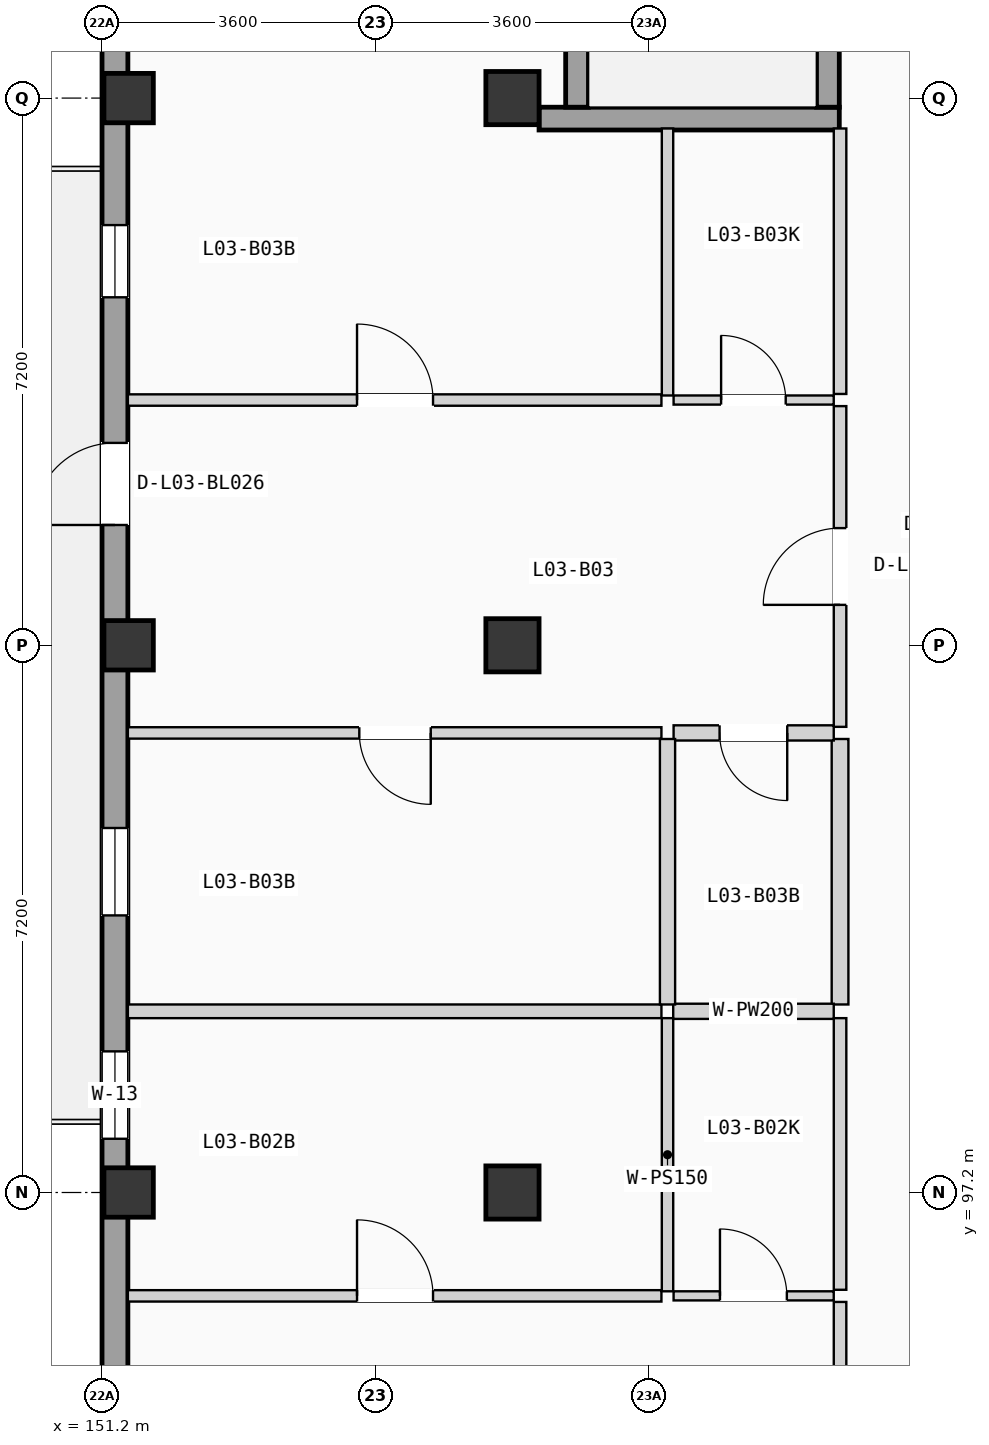
"""IFC4 building model, lengths in metres.
Left out: names, types, materials, properties, quantities, classifications, styles, units other than length and angle.
Written with IfcOpenShell. Run it as: python <this file> out.ifc"""

import sys

from ifc_helpers import new_model, si_unit, direction, frame, frame_2d, origin, origin_2d, place, context, subcontext, project, spatial, rectangle, extrude, element, fill, save


model = new_model("IFC4")
c1 = context("Model", 3, precision=1e-05, world=origin(), true_north=direction((0.0, 1.0)))
c2 = subcontext(c1, "Body", "Model", "MODEL_VIEW")
j1 = project(units=[si_unit("LENGTHUNIT", "METRE"), si_unit("PLANEANGLEUNIT", "RADIAN")], contexts=[c1])
p1 = place(None, origin())
s1 = spatial("IfcSite", under=j1, at=p1, CompositionType="ELEMENT")
p2 = place(p1, origin())
s2 = spatial("IfcBuilding", under=s1, at=p2, CompositionType="ELEMENT")
p3 = place(p2, frame((0.0, 0.0, 12.075)))
s3 = spatial("IfcBuildingStorey", under=s2, at=p3, CompositionType="ELEMENT", Elevation=12.075)
for number, where, z_axis, x_axis in (
    (1, (151.55, 97.2, 0.0), (0.0, 0.0, 1.0), (1.0, 0.0, 0.0)),
    (2, (151.55, 104.4, 0.0), (0.0, 0.0, 1.0), (1.0, 0.0, 0.0)),
    (3, (151.55, 111.6, 0.0), (0.0, 0.0, 1.0), (1.0, 0.0, 0.0)),
):
    element("IfcColumn", number, at=place(p3, frame(where, z_axis=z_axis, x_axis=x_axis)), inside=s3, PredefinedType="COLUMN", context=c2, shape_type="SweptSolid", body=[
        extrude(rectangle(XDim=0.65, YDim=0.65, at=origin_2d()), origin(), (0.0, 0.0, 1.0), 3.15),
    ])
for number, where, z_axis, x_axis in (
    (4, (156.6, 97.2, 0.0), (0.0, 0.0, 1.0), (1.0, 0.0, 0.0)),
    (5, (156.6, 104.4, 0.0), (0.0, 0.0, 1.0), (1.0, 0.0, 0.0)),
    (6, (156.6, 111.6, 0.0), (0.0, 0.0, 1.0), (1.0, 0.0, 0.0)),
):
    element("IfcColumn", number, at=place(p3, frame(where, z_axis=z_axis, x_axis=x_axis)), inside=s3, PredefinedType="COLUMN", context=c2, shape_type="SweptSolid", body=[
        extrude(rectangle(XDim=0.7, YDim=0.7, at=origin_2d()), origin(), (0.0, 0.0, 1.0), 3.15),
    ])
p4 = place(p3, frame((151.37, 68.74, 0.0), z_axis=(0.0, 0.0, 1.0), x_axis=(0.0, 1.0, 0.0)))
e7 = element("IfcWall", 7, at=p4, inside=s3, PredefinedType="SOLIDWALL", context=c2, shape_type="SweptSolid", body=[
    extrude(rectangle(XDim=49.72, YDim=0.34, at=frame_2d((24.86, 0.0))), origin(), (0.0, 0.0, 1.0), 2.89),
])
p5 = place(p4, frame((11.462, 0.0, 0.0)))
e8 = element("IfcOpeningElement", 8, at=p5, cuts=e7, PredefinedType="OPENING", context=c2, shape_type="SweptSolid", body=[
    extrude(rectangle(XDim=0.95, YDim=2.15, at=frame_2d((0.475, 1.075))), frame((0.0, 0.18, 0.0), z_axis=(0.0, -1.0, 0.0), x_axis=(1.0, 0.0, 0.0)), (0.0, 0.0, 1.0), 0.36),
])
p6 = place(p4, frame((8.481, 0.0, 0.555)))
e9 = element("IfcOpeningElement", 9, at=p6, cuts=e7, PredefinedType="OPENING", context=c2, shape_type="SweptSolid", body=[
    extrude(rectangle(XDim=1.05, YDim=1.65, at=frame_2d((0.525, 0.825))), frame((0.0, 0.18, 0.0), z_axis=(0.0, -1.0, 0.0), x_axis=(1.0, 0.0, 0.0)), (0.0, 0.0, 1.0), 0.36),
])
p7 = place(p4, frame((16.565, 0.0, 0.85)))
e10 = element("IfcOpeningElement", 10, at=p7, cuts=e7, PredefinedType="OPENING", context=c2, shape_type="SweptSolid", body=[
    extrude(rectangle(XDim=0.95, YDim=1.2, at=frame_2d((0.475, 0.6))), frame((0.0, 0.18, 0.0), z_axis=(0.0, -1.0, 0.0), x_axis=(1.0, 0.0, 0.0)), (0.0, 0.0, 1.0), 0.36),
])
p8 = place(p4, frame((24.285, 0.0, 0.9)))
e11 = element("IfcOpeningElement", 11, at=p8, cuts=e7, PredefinedType="OPENING", context=c2, shape_type="SweptSolid", body=[
    extrude(rectangle(XDim=1.15, YDim=1.2, at=frame_2d((0.575, 0.6))), frame((0.0, 0.18, 0.0), z_axis=(0.0, -1.0, 0.0), x_axis=(1.0, 0.0, 0.0)), (0.0, 0.0, 1.0), 0.36),
])
p9 = place(p4, frame((19.403, 0.0, 0.855)))
e12 = element("IfcOpeningElement", 12, at=p9, cuts=e7, PredefinedType="OPENING", context=c2, shape_type="SweptSolid", body=[
    extrude(rectangle(XDim=1.15, YDim=1.35, at=frame_2d((0.575, 0.675))), frame((0.0, 0.18, 0.0), z_axis=(0.0, -1.0, 0.0), x_axis=(1.0, 0.0, 0.0)), (0.0, 0.0, 1.0), 0.36),
])
p10 = place(p4, frame((29.167, 0.0, 0.705)))
e13 = element("IfcOpeningElement", 13, at=p10, cuts=e7, PredefinedType="OPENING", context=c2, shape_type="SweptSolid", body=[
    extrude(rectangle(XDim=1.15, YDim=1.5, at=frame_2d((0.575, 0.75))), frame((0.0, 0.18, 0.0), z_axis=(0.0, -1.0, 0.0), x_axis=(1.0, 0.0, 0.0)), (0.0, 0.0, 1.0), 0.36),
])
p11 = place(p4, frame((37.243, 0.0, 0.0)))
e14 = element("IfcOpeningElement", 14, at=p11, cuts=e7, PredefinedType="OPENING", context=c2, shape_type="SweptSolid", body=[
    extrude(rectangle(XDim=1.08, YDim=2.18, at=frame_2d((0.54, 1.09))), frame((0.0, 0.18, 0.0), z_axis=(0.0, -1.0, 0.0), x_axis=(1.0, 0.0, 0.0)), (0.0, 0.0, 1.0), 0.36),
])
p12 = place(p4, frame((32.106, 0.0, 0.555)))
e15 = element("IfcOpeningElement", 15, at=p12, cuts=e7, PredefinedType="OPENING", context=c2, shape_type="SweptSolid", body=[
    extrude(rectangle(XDim=1.15, YDim=1.65, at=frame_2d((0.575, 0.825))), frame((0.0, 0.18, 0.0), z_axis=(0.0, -1.0, 0.0), x_axis=(1.0, 0.0, 0.0)), (0.0, 0.0, 1.0), 0.36),
])
p13 = place(p4, frame((40.239, 0.0, 0.85)))
e16 = element("IfcOpeningElement", 16, at=p13, cuts=e7, PredefinedType="OPENING", context=c2, shape_type="SweptSolid", body=[
    extrude(rectangle(XDim=0.95, YDim=1.2, at=frame_2d((0.475, 0.6))), frame((0.0, 0.18, 0.0), z_axis=(0.0, -1.0, 0.0), x_axis=(1.0, 0.0, 0.0)), (0.0, 0.0, 1.0), 0.36),
])
p14 = place(p3, frame((156.95, 111.33, 0.0), z_axis=(0.0, 0.0, 1.0), x_axis=(1.0, 0.0, 0.0)))
e17 = element("IfcWall", 17, at=p14, inside=s3, PredefinedType="SHEAR", context=c2, shape_type="SweptSolid", body=[
    extrude(rectangle(XDim=3.95, YDim=0.3, at=frame_2d((1.975, 0.0))), origin(), (0.0, 0.0, 1.0), 2.89),
])
p15 = place(p3, frame((157.45, 111.48, 0.0), z_axis=(0.0, 0.0, 1.0), x_axis=(0.0, 1.0, 0.0)))
e18 = element("IfcWall", 18, at=p15, inside=s3, PredefinedType="SHEAR", context=c2, shape_type="SweptSolid", body=[
    extrude(rectangle(XDim=7.0, YDim=0.3, at=frame_2d((3.5, 0.0))), origin(), (0.0, 0.0, 1.0), 2.89),
])
p16 = place(p3, frame((160.75, 111.48, 0.0), z_axis=(0.0, 0.0, 1.0), x_axis=(0.0, 1.0, 0.0)))
e19 = element("IfcWall", 19, at=p16, inside=s3, PredefinedType="SHEAR", context=c2, shape_type="SweptSolid", body=[
    extrude(rectangle(XDim=7.0, YDim=0.3, at=frame_2d((3.5, 0.0))), origin(), (0.0, 0.0, 1.0), 2.89),
])
p17 = place(p16, frame((5.625, 0.0, 0.0)))
e20 = element("IfcOpeningElement", 20, at=p17, cuts=e19, PredefinedType="OPENING", context=c2, shape_type="SweptSolid", body=[
    extrude(rectangle(XDim=1.15, YDim=2.12, at=frame_2d((0.575, 1.06))), frame((0.0, 0.16, 0.0), z_axis=(0.0, -1.0, 0.0), x_axis=(1.0, 0.0, 0.0)), (0.0, 0.0, 1.0), 0.32),
])
p18 = place(p3, frame((160.91, 91.44, 0.0), z_axis=(0.0, 0.0, 1.0), x_axis=(0.0, 1.0, 0.0)))
e21 = element("IfcWall", 21, at=p18, inside=s3, PredefinedType="PARTITIONING", context=c2, shape_type="SweptSolid", body=[
    extrude(rectangle(XDim=4.32, YDim=0.165, at=frame_2d((2.16, 0.0))), origin(), (0.0, 0.0, 1.0), 2.87),
])
p19 = place(p18, frame((1.655, 0.0, 0.0)))
e22 = element("IfcOpeningElement", 22, at=p19, cuts=e21, PredefinedType="OPENING", context=c2, shape_type="SweptSolid", body=[
    extrude(rectangle(XDim=1.01, YDim=2.11, at=frame_2d((0.505, 1.055))), frame((0.0, 0.093, 0.0), z_axis=(0.0, -1.0, 0.0), x_axis=(1.0, 0.0, 0.0)), (0.0, 0.0, 1.0), 0.185),
])
p20 = place(p3, frame((160.91, 95.92, 0.0), z_axis=(0.0, 0.0, 1.0), x_axis=(0.0, 1.0, 0.0)))
e23 = element("IfcWall", 23, at=p20, inside=s3, PredefinedType="PARTITIONING", context=c2, shape_type="SweptSolid", body=[
    extrude(rectangle(XDim=3.574, YDim=0.165, at=frame_2d((1.787, 0.0))), origin(), (0.0, 0.0, 1.0), 2.87),
])
p21 = place(p3, frame((160.91, 103.327, 0.0), z_axis=(0.0, 0.0, 1.0), x_axis=(0.0, 1.0, 0.0)))
e24 = element("IfcWall", 24, at=p21, inside=s3, PredefinedType="PARTITIONING", context=c2, shape_type="SweptSolid", body=[
    extrude(rectangle(XDim=4.22, YDim=0.165, at=frame_2d((2.11, 0.0))), origin(), (0.0, 0.0, 1.0), 2.87),
])
p22 = place(p21, frame((1.605, 0.0, 0.0)))
e25 = element("IfcOpeningElement", 25, at=p22, cuts=e24, PredefinedType="OPENING", context=c2, shape_type="SweptSolid", body=[
    extrude(rectangle(XDim=1.01, YDim=2.11, at=frame_2d((0.505, 1.055))), frame((0.0, 0.093, 0.0), z_axis=(0.0, -1.0, 0.0), x_axis=(1.0, 0.0, 0.0)), (0.0, 0.0, 1.0), 0.185),
])
p23 = place(p3, frame((160.91, 99.674, 0.0), z_axis=(0.0, 0.0, 1.0), x_axis=(0.0, 1.0, 0.0)))
e26 = element("IfcWall", 26, at=p23, inside=s3, PredefinedType="PLUMBINGWALL", context=c2, shape_type="SweptSolid", body=[
    extrude(rectangle(XDim=3.493, YDim=0.22, at=frame_2d((1.747, 0.0))), origin(), (0.0, 0.0, 1.0), 2.87),
])
p24 = place(p3, frame((160.91, 107.707, 0.0), z_axis=(0.0, 0.0, 1.0), x_axis=(0.0, 1.0, 0.0)))
e27 = element("IfcWall", 27, at=p24, inside=s3, PredefinedType="PARTITIONING", context=c2, shape_type="SweptSolid", body=[
    extrude(rectangle(XDim=3.493, YDim=0.165, at=frame_2d((1.747, 0.0))), origin(), (0.0, 0.0, 1.0), 2.87),
])
p25 = place(p3, frame((158.72, 95.84, 0.0), z_axis=(0.0, 0.0, 1.0), x_axis=(1.0, 0.0, 0.0)))
e28 = element("IfcWall", 28, at=p25, inside=s3, PredefinedType="PARTITIONING", context=c2, shape_type="SweptSolid", body=[
    extrude(rectangle(XDim=2.107, YDim=0.12, at=frame_2d((1.053, 0.0))), origin(), (0.0, 0.0, 1.0), 2.87),
])
p26 = place(p25, frame((0.61, 0.0, 0.0)))
e29 = element("IfcOpeningElement", 29, at=p26, cuts=e28, PredefinedType="OPENING", context=c2, shape_type="SweptSolid", body=[
    extrude(rectangle(XDim=0.88, YDim=2.02, at=frame_2d((0.44, 1.01))), frame((0.0, 0.07, 0.0), z_axis=(0.0, -1.0, 0.0), x_axis=(1.0, 0.0, 0.0)), (0.0, 0.0, 1.0), 0.14),
])
p27 = place(p3, frame((151.54, 95.84, 0.0), z_axis=(0.0, 0.0, 1.0), x_axis=(1.0, 0.0, 0.0)))
e30 = element("IfcWall", 30, at=p27, inside=s3, PredefinedType="PARTITIONING", context=c2, shape_type="SweptSolid", body=[
    extrude(rectangle(XDim=7.02, YDim=0.15, at=frame_2d((3.51, 0.0))), origin(), (0.0, 0.0, 1.0), 2.87),
])
p28 = place(p27, frame((3.015, 0.0, 0.0)))
e31 = element("IfcOpeningElement", 31, at=p28, cuts=e30, PredefinedType="OPENING", context=c2, shape_type="SweptSolid", body=[
    extrude(rectangle(XDim=1.0, YDim=2.06, at=frame_2d((0.5, 1.03))), frame((0.0, 0.085, 0.0), z_axis=(0.0, -1.0, 0.0), x_axis=(1.0, 0.0, 0.0)), (0.0, 0.0, 1.0), 0.17),
])
p29 = place(p3, frame((158.64, 95.9, 0.0), z_axis=(0.0, 0.0, 1.0), x_axis=(0.0, 1.0, 0.0)))
e32 = element("IfcWall", 32, at=p29, inside=s3, PredefinedType="PARTITIONING", context=c2, shape_type="SweptSolid", body=[
    extrude(rectangle(XDim=3.594, YDim=0.15, at=frame_2d((1.797, 0.0))), origin(), (0.0, 0.0, 1.0), 2.87),
])
p30 = place(p3, frame((158.715, 99.584, 0.0), z_axis=(0.0, 0.0, 1.0), x_axis=(1.0, 0.0, 0.0)))
e33 = element("IfcWall", 33, at=p30, inside=s3, PredefinedType="PLUMBINGWALL", context=c2, shape_type="SweptSolid", body=[
    extrude(rectangle(XDim=2.112, YDim=0.2, at=frame_2d((1.056, 0.0))), origin(), (0.0, 0.0, 1.0), 2.87),
])
p31 = place(p3, frame((151.54, 99.584, 0.0), z_axis=(0.0, 0.0, 1.0), x_axis=(1.0, 0.0, 0.0)))
e34 = element("IfcWall", 34, at=p31, inside=s3, PredefinedType="PARTITIONING", context=c2, shape_type="SweptSolid", body=[
    extrude(rectangle(XDim=7.02, YDim=0.18, at=frame_2d((3.51, 0.0))), origin(), (0.0, 0.0, 1.0), 2.87),
])
p32 = place(p3, frame((158.72, 103.247, 0.0), z_axis=(0.0, 0.0, 1.0), x_axis=(1.0, 0.0, 0.0)))
e35 = element("IfcWall", 35, at=p32, inside=s3, PredefinedType="PLUMBINGWALL", context=c2, shape_type="SweptSolid", body=[
    extrude(rectangle(XDim=2.107, YDim=0.2, at=frame_2d((1.053, 0.0))), origin(), (0.0, 0.0, 1.0), 2.87),
])
p33 = place(p32, frame((0.605, 0.0, 0.0)))
e36 = element("IfcOpeningElement", 36, at=p33, cuts=e35, PredefinedType="OPENING", context=c2, shape_type="SweptSolid", body=[
    extrude(rectangle(XDim=0.89, YDim=2.03, at=frame_2d((0.445, 1.015))), frame((0.0, 0.11, 0.0), z_axis=(0.0, -1.0, 0.0), x_axis=(1.0, 0.0, 0.0)), (0.0, 0.0, 1.0), 0.22),
])
p34 = place(p3, frame((158.72, 107.627, 0.0), z_axis=(0.0, 0.0, 1.0), x_axis=(1.0, 0.0, 0.0)))
e37 = element("IfcWall", 37, at=p34, inside=s3, PredefinedType="PARTITIONING", context=c2, shape_type="SweptSolid", body=[
    extrude(rectangle(XDim=2.107, YDim=0.12, at=frame_2d((1.053, 0.0))), origin(), (0.0, 0.0, 1.0), 2.87),
])
p35 = place(p34, frame((0.625, 0.0, 0.0)))
e38 = element("IfcOpeningElement", 38, at=p35, cuts=e37, PredefinedType="OPENING", context=c2, shape_type="SweptSolid", body=[
    extrude(rectangle(XDim=0.85, YDim=2.01, at=frame_2d((0.425, 1.005))), frame((0.0, 0.07, 0.0), z_axis=(0.0, -1.0, 0.0), x_axis=(1.0, 0.0, 0.0)), (0.0, 0.0, 1.0), 0.14),
])
p36 = place(p3, frame((151.54, 103.247, 0.0), z_axis=(0.0, 0.0, 1.0), x_axis=(1.0, 0.0, 0.0)))
e39 = element("IfcWall", 39, at=p36, inside=s3, PredefinedType="PARTITIONING", context=c2, shape_type="SweptSolid", body=[
    extrude(rectangle(XDim=7.02, YDim=0.15, at=frame_2d((3.51, 0.0))), origin(), (0.0, 0.0, 1.0), 2.87),
])
p37 = place(p36, frame((3.045, 0.0, 0.0)))
e40 = element("IfcOpeningElement", 40, at=p37, cuts=e39, PredefinedType="OPENING", context=c2, shape_type="SweptSolid", body=[
    extrude(rectangle(XDim=0.94, YDim=2.06, at=frame_2d((0.47, 1.03))), frame((0.0, 0.085, 0.0), z_axis=(0.0, -1.0, 0.0), x_axis=(1.0, 0.0, 0.0)), (0.0, 0.0, 1.0), 0.17),
])
p38 = place(p3, frame((151.54, 107.627, 0.0), z_axis=(0.0, 0.0, 1.0), x_axis=(1.0, 0.0, 0.0)))
e41 = element("IfcWall", 41, at=p38, inside=s3, PredefinedType="PARTITIONING", context=c2, shape_type="SweptSolid", body=[
    extrude(rectangle(XDim=7.02, YDim=0.15, at=frame_2d((3.51, 0.0))), origin(), (0.0, 0.0, 1.0), 2.87),
])
p39 = place(p38, frame((3.015, 0.0, 0.0)))
e42 = element("IfcOpeningElement", 42, at=p39, cuts=e41, PredefinedType="OPENING", context=c2, shape_type="SweptSolid", body=[
    extrude(rectangle(XDim=1.0, YDim=2.06, at=frame_2d((0.5, 1.03))), frame((0.0, 0.085, 0.0), z_axis=(0.0, -1.0, 0.0), x_axis=(1.0, 0.0, 0.0)), (0.0, 0.0, 1.0), 0.17),
])
p40 = place(p3, frame((158.64, 99.674, 0.0), z_axis=(0.0, 0.0, 1.0), x_axis=(0.0, 1.0, 0.0)))
e43 = element("IfcWall", 43, at=p40, inside=s3, PredefinedType="PLUMBINGWALL", context=c2, shape_type="SweptSolid", body=[
    extrude(rectangle(XDim=3.493, YDim=0.2, at=frame_2d((1.747, 0.0))), origin(), (0.0, 0.0, 1.0), 2.87),
])
p41 = place(p3, frame((158.64, 107.687, 0.0), z_axis=(0.0, 0.0, 1.0), x_axis=(0.0, 1.0, 0.0)))
e44 = element("IfcWall", 44, at=p41, inside=s3, PredefinedType="PARTITIONING", context=c2, shape_type="SweptSolid", body=[
    extrude(rectangle(XDim=3.513, YDim=0.15, at=frame_2d((1.756, 0.0))), origin(), (0.0, 0.0, 1.0), 2.87),
])
p42 = place(p10, origin())
e45 = element("IfcWindow", 45, at=p42, inside=s3, PartitioningType="SINGLE_PANEL", PredefinedType="WINDOW", context=c2, shape_type="SweptSolid", body=[
    extrude(rectangle(XDim=1.15, YDim=1.5, at=frame_2d((0.575, 0.75))), frame((0.0, 0.03, 0.0), z_axis=(0.0, -1.0, 0.0), x_axis=(1.0, 0.0, 0.0)), (0.0, 0.0, 1.0), 0.06),
])
fill(e13, e45)
p43 = place(p11, origin())
e46 = element("IfcDoor", 46, at=p43, inside=s3, OperationType="SINGLE_SWING_LEFT", PredefinedType="DOOR", context=c2, shape_type="SweptSolid", body=[
    extrude(rectangle(XDim=1.08, YDim=2.18, at=frame_2d((0.54, 1.09))), frame((0.0, 0.025, 0.0), z_axis=(0.0, -1.0, 0.0), x_axis=(1.0, 0.0, 0.0)), (0.0, 0.0, 1.0), 0.05),
])
fill(e14, e46)
p44 = place(p12, origin())
e47 = element("IfcWindow", 47, at=p44, inside=s3, PartitioningType="SINGLE_PANEL", PredefinedType="WINDOW", context=c2, shape_type="SweptSolid", body=[
    extrude(rectangle(XDim=1.15, YDim=1.65, at=frame_2d((0.575, 0.825))), frame((0.0, 0.03, 0.0), z_axis=(0.0, -1.0, 0.0), x_axis=(1.0, 0.0, 0.0)), (0.0, 0.0, 1.0), 0.06),
])
fill(e15, e47)
p45 = place(p13, origin())
e48 = element("IfcWindow", 48, at=p45, inside=s3, PartitioningType="SINGLE_PANEL", PredefinedType="WINDOW", context=c2, shape_type="SweptSolid", body=[
    extrude(rectangle(XDim=0.95, YDim=1.2, at=frame_2d((0.475, 0.6))), frame((0.0, 0.03, 0.0), z_axis=(0.0, -1.0, 0.0), x_axis=(1.0, 0.0, 0.0)), (0.0, 0.0, 1.0), 0.06),
])
fill(e16, e48)
p46 = place(p22, origin())
e49 = element("IfcDoor", 49, at=p46, inside=s3, OperationType="SINGLE_SWING_LEFT", PredefinedType="DOOR", context=c2, shape_type="SweptSolid", body=[
    extrude(rectangle(XDim=1.01, YDim=2.11, at=frame_2d((0.505, 1.055))), frame((0.0, 0.025, 0.0), z_axis=(0.0, -1.0, 0.0), x_axis=(1.0, 0.0, 0.0)), (0.0, 0.0, 1.0), 0.05),
])
fill(e25, e49)
p47 = place(p26, origin())
e50 = element("IfcDoor", 50, at=p47, inside=s3, OperationType="SINGLE_SWING_LEFT", PredefinedType="DOOR", context=c2, shape_type="SweptSolid", body=[
    extrude(rectangle(XDim=0.88, YDim=2.02, at=frame_2d((0.44, 1.01))), frame((0.0, 0.025, 0.0), z_axis=(0.0, -1.0, 0.0), x_axis=(1.0, 0.0, 0.0)), (0.0, 0.0, 1.0), 0.05),
])
fill(e29, e50)
p48 = place(p28, origin())
e51 = element("IfcDoor", 51, at=p48, inside=s3, OperationType="SINGLE_SWING_LEFT", PredefinedType="DOOR", context=c2, shape_type="SweptSolid", body=[
    extrude(rectangle(XDim=1.0, YDim=2.06, at=frame_2d((0.5, 1.03))), frame((0.0, 0.025, 0.0), z_axis=(0.0, -1.0, 0.0), x_axis=(1.0, 0.0, 0.0)), (0.0, 0.0, 1.0), 0.05),
])
fill(e31, e51)
p49 = place(p33, frame((0.89, 0.0, 0.0), z_axis=(0.0, 0.0, 1.0), x_axis=(-1.0, 0.0, 0.0)))
e52 = element("IfcDoor", 52, at=p49, inside=s3, OperationType="SINGLE_SWING_RIGHT", PredefinedType="DOOR", context=c2, shape_type="SweptSolid", body=[
    extrude(rectangle(XDim=0.89, YDim=2.03, at=frame_2d((0.445, 1.015))), frame((0.0, 0.025, 0.0), z_axis=(0.0, -1.0, 0.0), x_axis=(1.0, 0.0, 0.0)), (0.0, 0.0, 1.0), 0.05),
])
fill(e36, e52)
p50 = place(p35, origin())
e53 = element("IfcDoor", 53, at=p50, inside=s3, OperationType="SINGLE_SWING_LEFT", PredefinedType="DOOR", context=c2, shape_type="SweptSolid", body=[
    extrude(rectangle(XDim=0.85, YDim=2.01, at=frame_2d((0.425, 1.005))), frame((0.0, 0.025, 0.0), z_axis=(0.0, -1.0, 0.0), x_axis=(1.0, 0.0, 0.0)), (0.0, 0.0, 1.0), 0.05),
])
fill(e38, e53)
p51 = place(p37, frame((0.94, 0.0, 0.0), z_axis=(0.0, 0.0, 1.0), x_axis=(-1.0, 0.0, 0.0)))
e54 = element("IfcDoor", 54, at=p51, inside=s3, OperationType="SINGLE_SWING_RIGHT", PredefinedType="DOOR", context=c2, shape_type="SweptSolid", body=[
    extrude(rectangle(XDim=0.94, YDim=2.06, at=frame_2d((0.47, 1.03))), frame((0.0, 0.025, 0.0), z_axis=(0.0, -1.0, 0.0), x_axis=(1.0, 0.0, 0.0)), (0.0, 0.0, 1.0), 0.05),
])
fill(e40, e54)
p52 = place(p39, origin())
e55 = element("IfcDoor", 55, at=p52, inside=s3, OperationType="SINGLE_SWING_LEFT", PredefinedType="DOOR", context=c2, shape_type="SweptSolid", body=[
    extrude(rectangle(XDim=1.0, YDim=2.06, at=frame_2d((0.5, 1.03))), frame((0.0, 0.025, 0.0), z_axis=(0.0, -1.0, 0.0), x_axis=(1.0, 0.0, 0.0)), (0.0, 0.0, 1.0), 0.05),
])
fill(e42, e55)
save(model, sys.argv[1])
